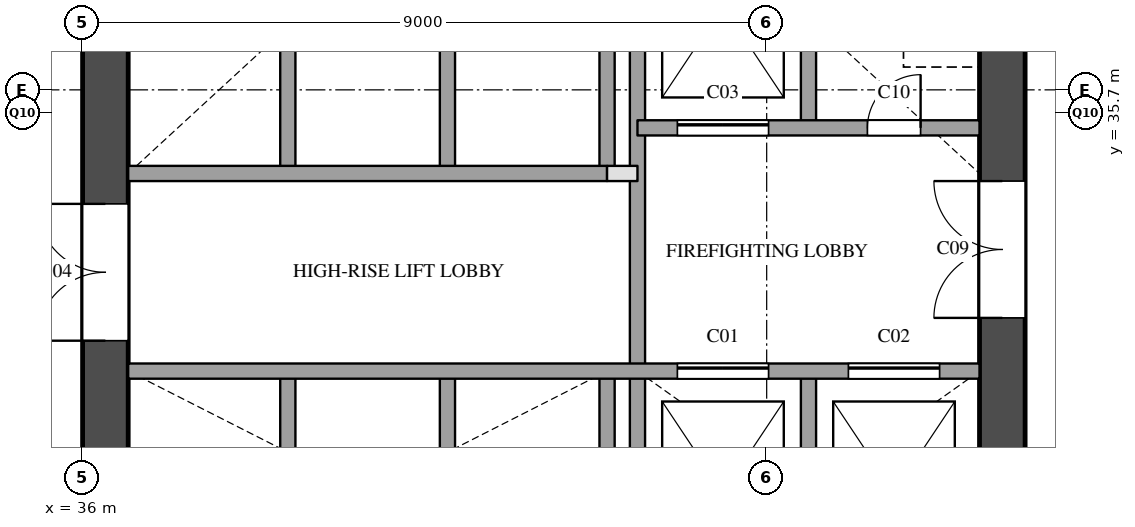
"""IFC4 building model, lengths in metres.
Left out: names, types, materials, properties, quantities, classifications, styles, units other than length and angle.
Written with IfcOpenShell. Run it as: python <this file> out.ifc"""

import sys

from ifc_helpers import new_model, si_unit, direction, frame, frame_2d, origin, place, context, subcontext, project, spatial, rectangle, extrude, element, fill, save


model = new_model("IFC4")
c1 = context("Model", 3, precision=1e-05, world=origin(), true_north=direction((0.0, 1.0)))
c2 = subcontext(c1, "Body", "Model", "MODEL_VIEW")
j1 = project(units=[si_unit("LENGTHUNIT", "METRE"), si_unit("PLANEANGLEUNIT", "RADIAN")], contexts=[c1])
p1 = place(None, origin())
s1 = spatial("IfcSite", under=j1, at=p1, CompositionType="ELEMENT")
p2 = place(p1, origin())
s2 = spatial("IfcBuilding", under=s1, at=p2, CompositionType="ELEMENT")
p3 = place(p2, frame((0.0, 0.0, 69.0)))
s3 = spatial("IfcBuildingStorey", under=s2, at=p3, CompositionType="ELEMENT", Elevation=69.0)
p4 = place(p3, frame((36.3, 29.1, 0.0), z_axis=(0.0, 0.0, 1.0), x_axis=(0.0, 1.0, 0.0)))
e1 = element("IfcWall", 1, at=p4, inside=s3, PredefinedType="SHEAR", context=c2, shape_type="SweptSolid", body=[
    extrude(rectangle(XDim=20.3, YDim=0.6, at=frame_2d((10.15, 0.0))), origin(), (0.0, 0.0, 1.0), 3.5),
])
p5 = place(p4, frame((3.6, 0.0, 0.0)))
e2 = element("IfcOpeningElement", 2, at=p5, cuts=e1, PredefinedType="OPENING", context=c2, shape_type="SweptSolid", body=[
    extrude(rectangle(XDim=1.8, YDim=2.1, at=frame_2d((0.9, 1.05))), frame((0.0, 0.31, 0.0), z_axis=(0.0, -1.0, 0.0), x_axis=(1.0, 0.0, 0.0)), (0.0, 0.0, 1.0), 0.62),
])
p6 = place(p4, frame((16.4, 0.0, 0.0)))
e3 = element("IfcOpeningElement", 3, at=p6, cuts=e1, PredefinedType="OPENING", context=c2, shape_type="SweptSolid", body=[
    extrude(rectangle(XDim=1.0, YDim=2.1, at=frame_2d((0.5, 1.05))), frame((0.0, 0.31, 0.0), z_axis=(0.0, -1.0, 0.0), x_axis=(1.0, 0.0, 0.0)), (0.0, 0.0, 1.0), 0.62),
])
p7 = place(p3, frame((48.1, 29.1, 0.0), z_axis=(0.0, 0.0, 1.0), x_axis=(0.0, 1.0, 0.0)))
e4 = element("IfcWall", 4, at=p7, inside=s3, PredefinedType="SHEAR", context=c2, shape_type="SweptSolid", body=[
    extrude(rectangle(XDim=20.3, YDim=0.6, at=frame_2d((10.15, 0.0))), origin(), (0.0, 0.0, 1.0), 3.5),
])
p8 = place(p7, frame((12.5, 0.0, 0.0)))
e5 = element("IfcOpeningElement", 5, at=p8, cuts=e4, PredefinedType="OPENING", context=c2, shape_type="SweptSolid", body=[
    extrude(rectangle(XDim=0.7, YDim=2.1, at=frame_2d((0.35, 1.05))), frame((0.0, 0.31, 0.0), z_axis=(0.0, -1.0, 0.0), x_axis=(1.0, 0.0, 0.0)), (0.0, 0.0, 1.0), 0.62),
])
p9 = place(p7, frame((3.9, 0.0, 0.0)))
e6 = element("IfcOpeningElement", 6, at=p9, cuts=e4, PredefinedType="OPENING", context=c2, shape_type="SweptSolid", body=[
    extrude(rectangle(XDim=1.8, YDim=2.1, at=frame_2d((0.9, 1.05))), frame((0.0, 0.31, 0.0), z_axis=(0.0, -1.0, 0.0), x_axis=(1.0, 0.0, 0.0)), (0.0, 0.0, 1.0), 0.62),
])
p10 = place(p3, frame((38.7, 29.1, 0.0), z_axis=(0.0, 0.0, 1.0), x_axis=(0.0, 1.0, 0.0)))
e7 = element("IfcWall", 7, at=p10, inside=s3, PredefinedType="SOLIDWALL", context=c2, shape_type="SweptSolid", body=[
    extrude(rectangle(XDim=3.2, YDim=0.2, at=frame_2d((1.6, 0.0))), origin(), (0.0, 0.0, 1.0), 3.5),
])
p11 = place(p3, frame((38.7, 34.9, 0.0), z_axis=(0.0, 0.0, 1.0), x_axis=(0.0, 1.0, 0.0)))
e8 = element("IfcWall", 8, at=p11, inside=s3, PredefinedType="SOLIDWALL", context=c2, shape_type="SweptSolid", body=[
    extrude(rectangle(XDim=3.2, YDim=0.2, at=frame_2d((1.6, 0.0))), origin(), (0.0, 0.0, 1.0), 3.5),
])
p12 = place(p3, frame((40.8, 29.1, 0.0), z_axis=(0.0, 0.0, 1.0), x_axis=(0.0, 1.0, 0.0)))
e9 = element("IfcWall", 9, at=p12, inside=s3, PredefinedType="SOLIDWALL", context=c2, shape_type="SweptSolid", body=[
    extrude(rectangle(XDim=3.2, YDim=0.2, at=frame_2d((1.6, 0.0))), origin(), (0.0, 0.0, 1.0), 3.5),
])
p13 = place(p3, frame((40.8, 34.9, 0.0), z_axis=(0.0, 0.0, 1.0), x_axis=(0.0, 1.0, 0.0)))
e10 = element("IfcWall", 10, at=p13, inside=s3, PredefinedType="SOLIDWALL", context=c2, shape_type="SweptSolid", body=[
    extrude(rectangle(XDim=3.2, YDim=0.2, at=frame_2d((1.6, 0.0))), origin(), (0.0, 0.0, 1.0), 3.5),
])
p14 = place(p3, frame((42.9, 29.1, 0.0), z_axis=(0.0, 0.0, 1.0), x_axis=(0.0, 1.0, 0.0)))
e11 = element("IfcWall", 11, at=p14, inside=s3, PredefinedType="SOLIDWALL", context=c2, shape_type="SweptSolid", body=[
    extrude(rectangle(XDim=3.2, YDim=0.2, at=frame_2d((1.6, 0.0))), origin(), (0.0, 0.0, 1.0), 3.5),
])
p15 = place(p3, frame((42.9, 34.9, 0.0), z_axis=(0.0, 0.0, 1.0), x_axis=(0.0, 1.0, 0.0)))
e12 = element("IfcWall", 12, at=p15, inside=s3, PredefinedType="SOLIDWALL", context=c2, shape_type="SweptSolid", body=[
    extrude(rectangle(XDim=3.2, YDim=0.2, at=frame_2d((1.6, 0.0))), origin(), (0.0, 0.0, 1.0), 3.5),
])
p16 = place(p3, frame((43.3, 29.1, 0.0), z_axis=(0.0, 0.0, 1.0), x_axis=(0.0, 1.0, 0.0)))
e13 = element("IfcWall", 13, at=p16, inside=s3, PredefinedType="SOLIDWALL", context=c2, shape_type="SweptSolid", body=[
    extrude(rectangle(XDim=9.9, YDim=0.2, at=frame_2d((4.95, 0.0))), origin(), (0.0, 0.0, 1.0), 3.5),
])
for number, where, z_axis, x_axis in (
    (14, (45.55, 29.1, 0.0), (0.0, 0.0, 1.0), (0.0, 1.0, 0.0)),
    (15, (45.55, 35.5, 0.0), (0.0, 0.0, 1.0), (0.0, 1.0, 0.0)),
):
    element("IfcWall", number, at=place(p3, frame(where, z_axis=z_axis, x_axis=x_axis)), inside=s3, PredefinedType="SOLIDWALL", context=c2, shape_type="SweptSolid", body=[
        extrude(rectangle(XDim=3.2, YDim=0.2, at=frame_2d((1.6, 0.0))), origin(), (0.0, 0.0, 1.0), 3.5),
    ])
p17 = place(p3, frame((36.6, 32.3, 0.0), z_axis=(0.0, 0.0, 1.0), x_axis=(1.0, 0.0, 0.0)))
e16 = element("IfcWall", 16, at=p17, inside=s3, PredefinedType="SOLIDWALL", context=c2, shape_type="SweptSolid", body=[
    extrude(rectangle(XDim=11.2, YDim=0.2, at=frame_2d((5.6, 0.0))), origin(), (0.0, 0.0, 1.0), 3.5),
])
p18 = place(p17, frame((7.225, 0.0, 0.0)))
e17 = element("IfcOpeningElement", 17, at=p18, cuts=e16, PredefinedType="OPENING", context=c2, shape_type="SweptSolid", body=[
    extrude(rectangle(XDim=1.2, YDim=2.1, at=frame_2d((0.6, 1.05))), frame((0.0, 0.11, 0.0), z_axis=(0.0, -1.0, 0.0), x_axis=(1.0, 0.0, 0.0)), (0.0, 0.0, 1.0), 0.22),
])
p19 = place(p17, frame((9.475, 0.0, 0.0)))
e18 = element("IfcOpeningElement", 18, at=p19, cuts=e16, PredefinedType="OPENING", context=c2, shape_type="SweptSolid", body=[
    extrude(rectangle(XDim=1.2, YDim=2.1, at=frame_2d((0.6, 1.05))), frame((0.0, 0.11, 0.0), z_axis=(0.0, -1.0, 0.0), x_axis=(1.0, 0.0, 0.0)), (0.0, 0.0, 1.0), 0.22),
])
p20 = place(p3, frame((42.9, 34.9, 0.0), z_axis=(0.0, 0.0, 1.0), x_axis=(1.0, 0.0, 0.0)))
e19 = element("IfcWall", 19, at=p20, inside=s3, PredefinedType="PARTITIONING", context=c2, shape_type="SweptSolid", body=[
    extrude(rectangle(XDim=0.4, YDim=0.2, at=frame_2d((0.2, 0.0))), origin(), (0.0, 0.0, 1.0), 3.5),
])
p21 = place(p3, frame((36.6, 34.9, 0.0), z_axis=(0.0, 0.0, 1.0), x_axis=(1.0, 0.0, 0.0)))
e20 = element("IfcWall", 20, at=p21, inside=s3, PredefinedType="SOLIDWALL", context=c2, shape_type="SweptSolid", body=[
    extrude(rectangle(XDim=6.3, YDim=0.2, at=frame_2d((3.15, 0.0))), origin(), (0.0, 0.0, 1.0), 3.5),
])
p22 = place(p3, frame((43.3, 35.5, 0.0), z_axis=(0.0, 0.0, 1.0), x_axis=(1.0, 0.0, 0.0)))
e21 = element("IfcWall", 21, at=p22, inside=s3, PredefinedType="SOLIDWALL", context=c2, shape_type="SweptSolid", body=[
    extrude(rectangle(XDim=4.5, YDim=0.2, at=frame_2d((2.25, 0.0))), origin(), (0.0, 0.0, 1.0), 3.5),
])
p23 = place(p22, frame((0.525, 0.0, 0.0)))
e22 = element("IfcOpeningElement", 22, at=p23, cuts=e21, PredefinedType="OPENING", context=c2, shape_type="SweptSolid", body=[
    extrude(rectangle(XDim=1.2, YDim=2.1, at=frame_2d((0.6, 1.05))), frame((0.0, 0.11, 0.0), z_axis=(0.0, -1.0, 0.0), x_axis=(1.0, 0.0, 0.0)), (0.0, 0.0, 1.0), 0.22),
])
p24 = place(p22, frame((3.025, 0.0, 0.0)))
e23 = element("IfcOpeningElement", 23, at=p24, cuts=e21, PredefinedType="OPENING", context=c2, shape_type="SweptSolid", body=[
    extrude(rectangle(XDim=0.7, YDim=2.1, at=frame_2d((0.35, 1.05))), frame((0.0, 0.11, 0.0), z_axis=(0.0, -1.0, 0.0), x_axis=(1.0, 0.0, 0.0)), (0.0, 0.0, 1.0), 0.22),
])
p25 = place(p18, origin())
e24 = element("IfcDoor", 24, at=p25, inside=s3, OperationType="SLIDING_TO_LEFT", PredefinedType="DOOR", context=c2, shape_type="SweptSolid", body=[
    extrude(rectangle(XDim=1.2, YDim=2.1, at=frame_2d((0.6, 1.05))), frame((0.0, 0.025, 0.0), z_axis=(0.0, -1.0, 0.0), x_axis=(1.0, 0.0, 0.0)), (0.0, 0.0, 1.0), 0.05),
])
fill(e17, e24)
p26 = place(p19, origin())
e25 = element("IfcDoor", 25, at=p26, inside=s3, OperationType="SLIDING_TO_LEFT", PredefinedType="DOOR", context=c2, shape_type="SweptSolid", body=[
    extrude(rectangle(XDim=1.2, YDim=2.1, at=frame_2d((0.6, 1.05))), frame((0.0, 0.025, 0.0), z_axis=(0.0, -1.0, 0.0), x_axis=(1.0, 0.0, 0.0)), (0.0, 0.0, 1.0), 0.05),
])
fill(e18, e25)
p27 = place(p23, origin())
e26 = element("IfcDoor", 26, at=p27, inside=s3, OperationType="SLIDING_TO_LEFT", PredefinedType="DOOR", context=c2, shape_type="SweptSolid", body=[
    extrude(rectangle(XDim=1.2, YDim=2.1, at=frame_2d((0.6, 1.05))), frame((0.0, 0.025, 0.0), z_axis=(0.0, -1.0, 0.0), x_axis=(1.0, 0.0, 0.0)), (0.0, 0.0, 1.0), 0.05),
])
fill(e22, e26)
p28 = place(p5, origin())
e27 = element("IfcDoor", 27, at=p28, inside=s3, OperationType="DOUBLE_DOOR_SINGLE_SWING", PredefinedType="DOOR", context=c2, shape_type="SweptSolid", body=[
    extrude(rectangle(XDim=1.8, YDim=2.1, at=frame_2d((0.9, 1.05))), frame((0.0, 0.025, 0.0), z_axis=(0.0, -1.0, 0.0), x_axis=(1.0, 0.0, 0.0)), (0.0, 0.0, 1.0), 0.05),
])
fill(e2, e27)
p29 = place(p9, origin())
e28 = element("IfcDoor", 28, at=p29, inside=s3, OperationType="DOUBLE_DOOR_SINGLE_SWING", PredefinedType="DOOR", context=c2, shape_type="SweptSolid", body=[
    extrude(rectangle(XDim=1.8, YDim=2.1, at=frame_2d((0.9, 1.05))), frame((0.0, 0.025, 0.0), z_axis=(0.0, -1.0, 0.0), x_axis=(1.0, 0.0, 0.0)), (0.0, 0.0, 1.0), 0.05),
])
fill(e6, e28)
p30 = place(p24, origin())
e29 = element("IfcDoor", 29, at=p30, inside=s3, OperationType="SINGLE_SWING_RIGHT", PredefinedType="DOOR", context=c2, shape_type="SweptSolid", body=[
    extrude(rectangle(XDim=0.7, YDim=2.1, at=frame_2d((0.35, 1.05))), frame((0.0, 0.025, 0.0), z_axis=(0.0, -1.0, 0.0), x_axis=(1.0, 0.0, 0.0)), (0.0, 0.0, 1.0), 0.05),
])
fill(e23, e29)
save(model, sys.argv[1])
